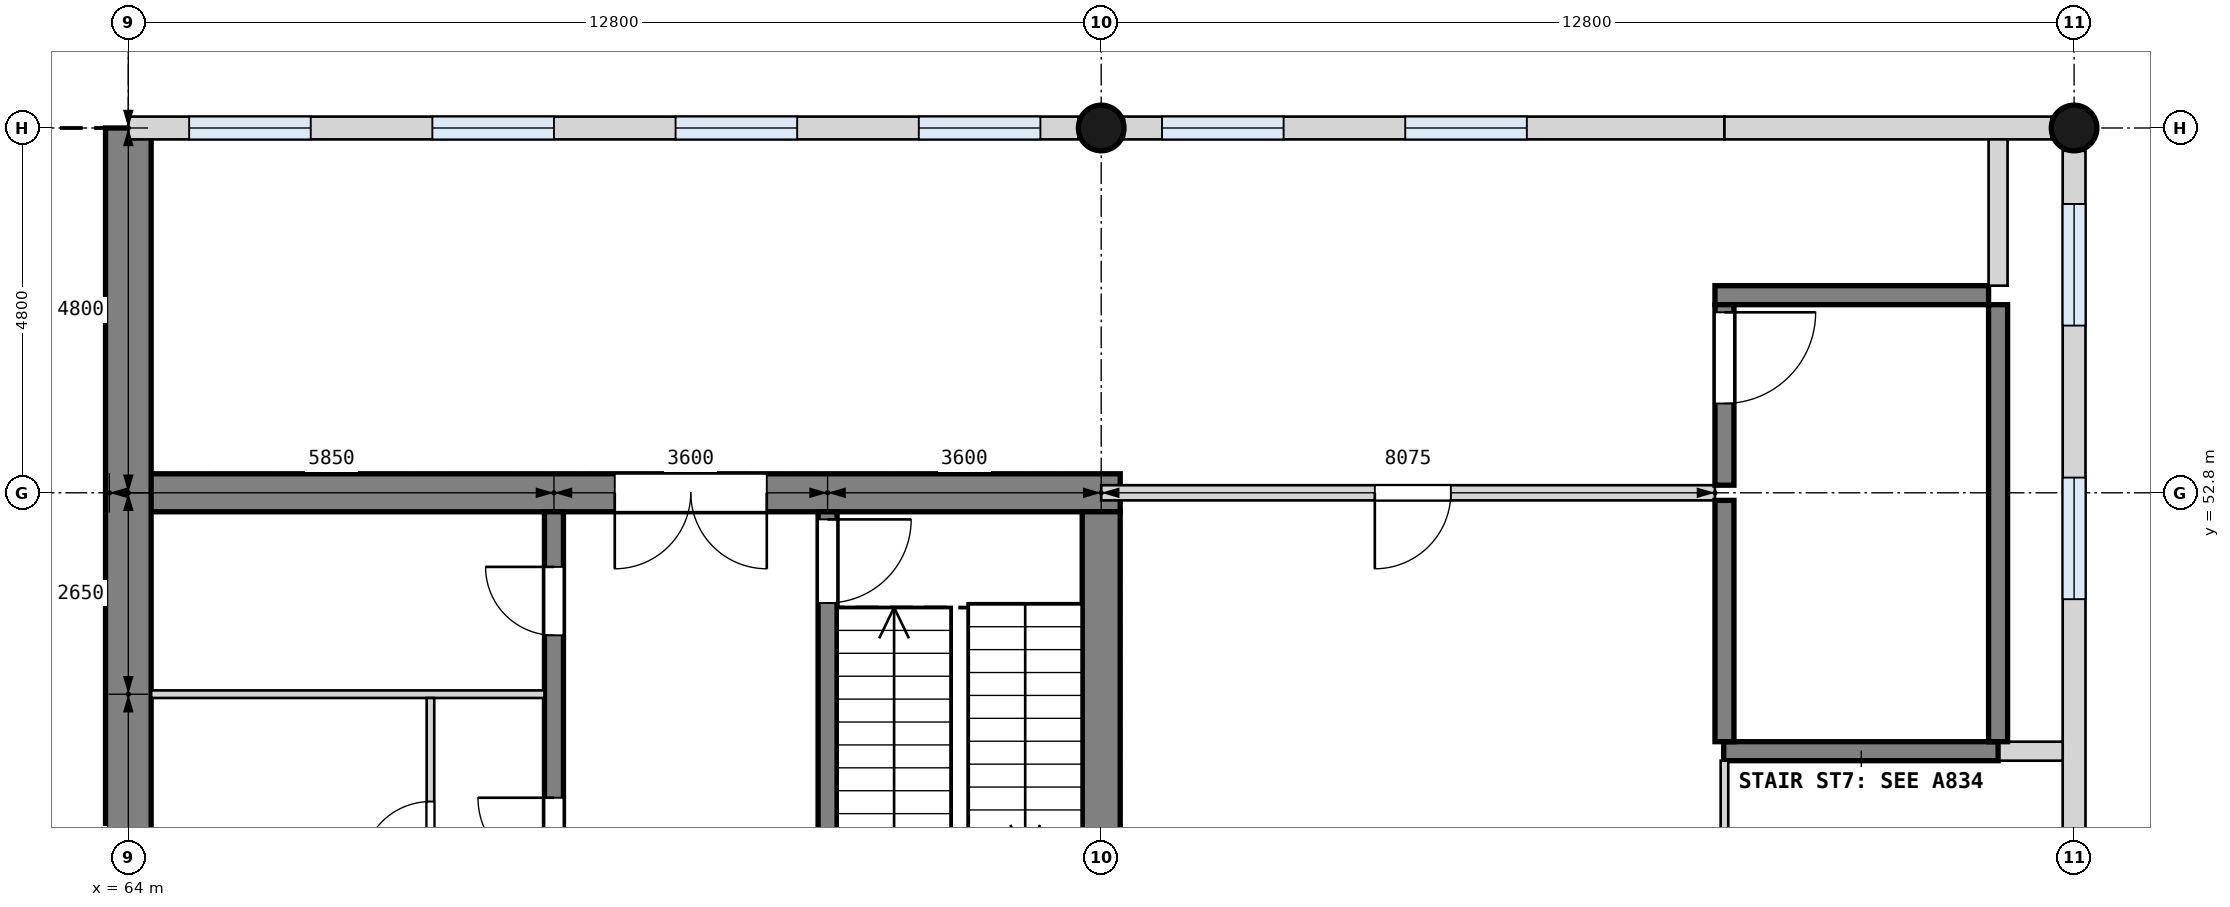
"""IFC4 building model, lengths in metres.
Left out: names, types, materials, properties, quantities, classifications, styles, units other than length and angle.
Written with IfcOpenShell. Run it as: python <this file> out.ifc"""

import sys

from ifc_helpers import new_model, si_unit, direction, frame, frame_2d, origin, origin_2d, place, context, subcontext, project, spatial, rectangle, circle, extrude, element, fill, save


model = new_model("IFC4")
c1 = context("Model", 3, precision=1e-05, world=origin(), true_north=direction((0.0, 1.0)))
c2 = subcontext(c1, "Body", "Model", "MODEL_VIEW")
j1 = project(units=[si_unit("LENGTHUNIT", "METRE"), si_unit("PLANEANGLEUNIT", "RADIAN")], contexts=[c1])
p1 = place(None, origin())
s1 = spatial("IfcSite", under=j1, at=p1, CompositionType="ELEMENT")
p2 = place(p1, origin())
s2 = spatial("IfcBuilding", under=s1, at=p2, CompositionType="ELEMENT")
p3 = place(p2, frame((0.0, 0.0, 4.2)))
s3 = spatial("IfcBuildingStorey", under=s2, at=p3, CompositionType="ELEMENT", Elevation=4.2)
p4 = place(p3, frame((63.75, 52.8, 0.0), z_axis=(0.0, 0.0, 1.0), x_axis=(1.0, 0.0, 0.0)))
e1 = element("IfcWall", 1, at=p4, inside=s3, PredefinedType="SHEAR", context=c2, shape_type="SweptSolid", body=[
    extrude(rectangle(XDim=13.3, YDim=0.5, at=frame_2d((6.65, 0.0))), origin(), (0.0, 0.0, 1.0), 4.2),
])
p5 = place(p4, frame((6.65, 0.0, 0.0)))
e2 = element("IfcOpeningElement", 2, at=p5, cuts=e1, PredefinedType="OPENING", context=c2, shape_type="SweptSolid", body=[
    extrude(rectangle(XDim=2.0, YDim=2.1, at=frame_2d((1.0, 1.05))), frame((0.0, 0.26, 0.0), z_axis=(0.0, -1.0, 0.0), x_axis=(1.0, 0.0, 0.0)), (0.0, 0.0, 1.0), 0.52),
])
p6 = place(p3, frame((76.8, 33.85, 0.0), z_axis=(0.0, 0.0, 1.0), x_axis=(0.0, 1.0, 0.0)))
e3 = element("IfcWall", 3, at=p6, inside=s3, PredefinedType="SHEAR", context=c2, shape_type="SweptSolid", body=[
    extrude(rectangle(XDim=18.7, YDim=0.5, at=frame_2d((9.35, 0.0))), origin(), (0.0, 0.0, 1.0), 4.2),
])
p7 = place(p3, frame((64.0, 28.8, 0.0), z_axis=(0.0, 0.0, 1.0), x_axis=(0.0, 1.0, 0.0)))
e4 = element("IfcWall", 4, at=p7, inside=s3, PredefinedType="SHEAR", context=c2, shape_type="SweptSolid", body=[
    extrude(rectangle(XDim=28.8, YDim=0.6, at=frame_2d((14.4, 0.0))), origin(), (0.0, 0.0, 1.0), 4.2),
])
for number, where, z_axis, x_axis in (
    (5, (89.6, 57.6, 0.0), (0.0, 0.0, 1.0), (1.0, 0.0, 0.0)),
    (6, (76.8, 57.6, 0.0), (0.0, 0.0, 1.0), (1.0, 0.0, 0.0)),
):
    element("IfcColumn", number, at=place(p3, frame(where, z_axis=z_axis, x_axis=x_axis)), inside=s3, PredefinedType="COLUMN", context=c2, shape_type="SweptSolid", body=[
        extrude(circle(Radius=0.3, at=origin_2d()), origin(), (0.0, 0.0, 1.0), 4.2),
    ])
p8 = place(p3, frame((64.0, 57.6, 0.0), z_axis=(0.0, 0.0, 1.0), x_axis=(1.0, 0.0, 0.0)))
e7 = element("IfcWall", 7, at=p8, inside=s3, PredefinedType="SOLIDWALL", context=c2, shape_type="SweptSolid", body=[
    extrude(rectangle(XDim=12.5, YDim=0.3, at=frame_2d((6.25, 0.0))), origin(), (0.0, 0.0, 1.0), 3.0),
])
p9 = place(p8, frame((0.8, 0.0, 1.0)))
e8 = element("IfcOpeningElement", 8, at=p9, cuts=e7, PredefinedType="OPENING", context=c2, shape_type="SweptSolid", body=[
    extrude(rectangle(XDim=1.6, YDim=1.8, at=frame_2d((0.8, 0.9))), frame((0.0, 0.16, 0.0), z_axis=(0.0, -1.0, 0.0), x_axis=(1.0, 0.0, 0.0)), (0.0, 0.0, 1.0), 0.32),
])
p10 = place(p8, frame((4.0, 0.0, 1.0)))
e9 = element("IfcOpeningElement", 9, at=p10, cuts=e7, PredefinedType="OPENING", context=c2, shape_type="SweptSolid", body=[
    extrude(rectangle(XDim=1.6, YDim=1.8, at=frame_2d((0.8, 0.9))), frame((0.0, 0.16, 0.0), z_axis=(0.0, -1.0, 0.0), x_axis=(1.0, 0.0, 0.0)), (0.0, 0.0, 1.0), 0.32),
])
p11 = place(p8, frame((7.2, 0.0, 1.0)))
e10 = element("IfcOpeningElement", 10, at=p11, cuts=e7, PredefinedType="OPENING", context=c2, shape_type="SweptSolid", body=[
    extrude(rectangle(XDim=1.6, YDim=1.8, at=frame_2d((0.8, 0.9))), frame((0.0, 0.16, 0.0), z_axis=(0.0, -1.0, 0.0), x_axis=(1.0, 0.0, 0.0)), (0.0, 0.0, 1.0), 0.32),
])
p12 = place(p8, frame((10.4, 0.0, 1.0)))
e11 = element("IfcOpeningElement", 11, at=p12, cuts=e7, PredefinedType="OPENING", context=c2, shape_type="SweptSolid", body=[
    extrude(rectangle(XDim=1.6, YDim=1.8, at=frame_2d((0.8, 0.9))), frame((0.0, 0.16, 0.0), z_axis=(0.0, -1.0, 0.0), x_axis=(1.0, 0.0, 0.0)), (0.0, 0.0, 1.0), 0.32),
])
p13 = place(p3, frame((77.1, 57.6, 0.0), z_axis=(0.0, 0.0, 1.0), x_axis=(1.0, 0.0, 0.0)))
e12 = element("IfcWall", 12, at=p13, inside=s3, PredefinedType="SOLIDWALL", context=c2, shape_type="SweptSolid", body=[
    extrude(rectangle(XDim=7.9, YDim=0.3, at=frame_2d((3.95, 0.0))), origin(), (0.0, 0.0, 1.0), 3.0),
])
p14 = place(p13, frame((0.5, 0.0, 1.0)))
e13 = element("IfcOpeningElement", 13, at=p14, cuts=e12, PredefinedType="OPENING", context=c2, shape_type="SweptSolid", body=[
    extrude(rectangle(XDim=1.6, YDim=1.8, at=frame_2d((0.8, 0.9))), frame((0.0, 0.16, 0.0), z_axis=(0.0, -1.0, 0.0), x_axis=(1.0, 0.0, 0.0)), (0.0, 0.0, 1.0), 0.32),
])
p15 = place(p13, frame((3.7, 0.0, 1.0)))
e14 = element("IfcOpeningElement", 14, at=p15, cuts=e12, PredefinedType="OPENING", context=c2, shape_type="SweptSolid", body=[
    extrude(rectangle(XDim=1.6, YDim=1.8, at=frame_2d((0.8, 0.9))), frame((0.0, 0.16, 0.0), z_axis=(0.0, -1.0, 0.0), x_axis=(1.0, 0.0, 0.0)), (0.0, 0.0, 1.0), 0.32),
])
p16 = place(p3, frame((85.0, 57.6, 0.0), z_axis=(0.0, 0.0, 1.0), x_axis=(1.0, 0.0, 0.0)))
e15 = element("IfcWall", 15, at=p16, inside=s3, PredefinedType="SOLIDWALL", context=c2, shape_type="SweptSolid", body=[
    extrude(rectangle(XDim=4.3, YDim=0.3, at=frame_2d((2.15, 0.0))), origin(), (0.0, 0.0, 1.0), 3.0),
])
p17 = place(p3, frame((89.6, 43.5, 0.0), z_axis=(0.0, 0.0, 1.0), x_axis=(0.0, 1.0, 0.0)))
e16 = element("IfcWall", 16, at=p17, inside=s3, PredefinedType="SOLIDWALL", context=c2, shape_type="SweptSolid", body=[
    extrude(rectangle(XDim=13.8, YDim=0.3, at=frame_2d((6.9, 0.0))), origin(), (0.0, 0.0, 1.0), 2.9),
])
p18 = place(p17, frame((0.7, 0.0, 1.0)))
e17 = element("IfcOpeningElement", 17, at=p18, cuts=e16, PredefinedType="OPENING", context=c2, shape_type="SweptSolid", body=[
    extrude(rectangle(XDim=1.6, YDim=1.8, at=frame_2d((0.8, 0.9))), frame((0.0, 0.16, 0.0), z_axis=(0.0, -1.0, 0.0), x_axis=(1.0, 0.0, 0.0)), (0.0, 0.0, 1.0), 0.32),
])
p19 = place(p17, frame((7.9, 0.0, 1.0)))
e18 = element("IfcOpeningElement", 18, at=p19, cuts=e16, PredefinedType="OPENING", context=c2, shape_type="SweptSolid", body=[
    extrude(rectangle(XDim=1.6, YDim=1.8, at=frame_2d((0.8, 0.9))), frame((0.0, 0.16, 0.0), z_axis=(0.0, -1.0, 0.0), x_axis=(1.0, 0.0, 0.0)), (0.0, 0.0, 1.0), 0.32),
])
p20 = place(p17, frame((11.5, 0.0, 1.0)))
e19 = element("IfcOpeningElement", 19, at=p20, cuts=e16, PredefinedType="OPENING", context=c2, shape_type="SweptSolid", body=[
    extrude(rectangle(XDim=1.6, YDim=1.8, at=frame_2d((0.8, 0.9))), frame((0.0, 0.16, 0.0), z_axis=(0.0, -1.0, 0.0), x_axis=(1.0, 0.0, 0.0)), (0.0, 0.0, 1.0), 0.32),
])
p21 = place(p3, frame((73.2, 46.475, 0.0), z_axis=(0.0, 0.0, 1.0), x_axis=(0.0, 1.0, 0.0)))
e20 = element("IfcWall", 20, at=p21, inside=s3, PredefinedType="SOLIDWALL", context=c2, shape_type="SweptSolid", body=[
    extrude(rectangle(XDim=6.075, YDim=0.25, at=frame_2d((3.038, 0.0))), origin(), (0.0, 0.0, 1.0), 3.9),
])
p22 = place(p21, frame((4.875, 0.0, 0.0)))
e21 = element("IfcOpeningElement", 21, at=p22, cuts=e20, PredefinedType="OPENING", context=c2, shape_type="SweptSolid", body=[
    extrude(rectangle(XDim=1.1, YDim=2.1, at=frame_2d((0.55, 1.05))), frame((0.0, 0.135, 0.0), z_axis=(0.0, -1.0, 0.0), x_axis=(1.0, 0.0, 0.0)), (0.0, 0.0, 1.0), 0.27),
])
p23 = place(p3, frame((69.6, 46.475, 0.0), z_axis=(0.0, 0.0, 1.0), x_axis=(0.0, 1.0, 0.0)))
e22 = element("IfcWall", 22, at=p23, inside=s3, PredefinedType="SOLIDWALL", context=c2, shape_type="SweptSolid", body=[
    extrude(rectangle(XDim=6.075, YDim=0.25, at=frame_2d((3.038, 0.0))), origin(), (0.0, 0.0, 1.0), 3.9),
])
p24 = place(p23, frame((1.312, 0.0, 0.0)))
e23 = element("IfcOpeningElement", 23, at=p24, cuts=e22, PredefinedType="OPENING", context=c2, shape_type="SweptSolid", body=[
    extrude(rectangle(XDim=1.0, YDim=2.1, at=frame_2d((0.5, 1.05))), frame((0.0, 0.135, 0.0), z_axis=(0.0, -1.0, 0.0), x_axis=(1.0, 0.0, 0.0)), (0.0, 0.0, 1.0), 0.27),
])
p25 = place(p23, frame((4.45, 0.0, 0.0)))
e24 = element("IfcOpeningElement", 24, at=p25, cuts=e22, PredefinedType="OPENING", context=c2, shape_type="SweptSolid", body=[
    extrude(rectangle(XDim=0.9, YDim=2.1, at=frame_2d((0.45, 1.05))), frame((0.0, 0.135, 0.0), z_axis=(0.0, -1.0, 0.0), x_axis=(1.0, 0.0, 0.0)), (0.0, 0.0, 1.0), 0.27),
])
p26 = place(p3, frame((69.475, 50.15, 0.0), z_axis=(0.0, 0.0, 1.0), x_axis=(-1.0, 0.0, 0.0)))
e25 = element("IfcWall", 25, at=p26, inside=s3, PredefinedType="PARTITIONING", context=c2, shape_type="SweptSolid", body=[
    extrude(rectangle(XDim=5.175, YDim=0.1, at=frame_2d((2.587, 0.0))), origin(), (0.0, 0.0, 1.0), 3.9),
])
p27 = place(p3, frame((67.975, 46.475, 0.0), z_axis=(0.0, 0.0, 1.0), x_axis=(0.0, 1.0, 0.0)))
e26 = element("IfcWall", 26, at=p27, inside=s3, PredefinedType="PARTITIONING", context=c2, shape_type="SweptSolid", body=[
    extrude(rectangle(XDim=3.625, YDim=0.1, at=frame_2d((1.812, 0.0))), origin(), (0.0, 0.0, 1.0), 3.9),
])
p28 = place(p27, frame((1.363, 0.0, 0.0)))
e27 = element("IfcOpeningElement", 27, at=p28, cuts=e26, PredefinedType="OPENING", context=c2, shape_type="SweptSolid", body=[
    extrude(rectangle(XDim=0.9, YDim=2.1, at=frame_2d((0.45, 1.05))), frame((0.0, 0.06, 0.0), z_axis=(0.0, -1.0, 0.0), x_axis=(1.0, 0.0, 0.0)), (0.0, 0.0, 1.0), 0.12),
])
p29 = place(p3, frame((89.45, 49.4, 0.0), z_axis=(0.0, 0.0, 1.0), x_axis=(-1.0, 0.0, 0.0)))
e28 = element("IfcWall", 28, at=p29, inside=s3, PredefinedType="PARTITIONING", context=c2, shape_type="SweptSolid", body=[
    extrude(rectangle(XDim=0.85, YDim=0.25, at=frame_2d((0.425, 0.0))), origin(), (0.0, 0.0, 1.0), 3.9),
])
p30 = place(p3, frame((88.6, 49.4, 0.0), z_axis=(0.0, 0.0, 1.0), x_axis=(-1.0, 0.0, 0.0)))
e29 = element("IfcWall", 29, at=p30, inside=s3, PredefinedType="SHEAR", context=c2, shape_type="SweptSolid", body=[
    extrude(rectangle(XDim=3.61, YDim=0.25, at=frame_2d((1.805, 0.0))), origin(), (0.0, 0.0, 1.0), 3.9),
])
p31 = place(p3, frame((84.875, 52.8, 0.0), z_axis=(0.0, 0.0, 1.0), x_axis=(-1.0, 0.0, 0.0)))
e30 = element("IfcWall", 30, at=p31, inside=s3, PredefinedType="PARTITIONING", context=c2, shape_type="SweptSolid", body=[
    extrude(rectangle(XDim=8.075, YDim=0.2, at=frame_2d((4.038, 0.0))), origin(), (0.0, 0.0, 1.0), 3.9),
])
p32 = place(p31, frame((3.475, 0.0, 0.0)))
e31 = element("IfcOpeningElement", 31, at=p32, cuts=e30, PredefinedType="OPENING", context=c2, shape_type="SweptSolid", body=[
    extrude(rectangle(XDim=1.0, YDim=2.1, at=frame_2d((0.5, 1.05))), frame((0.0, 0.11, 0.0), z_axis=(0.0, -1.0, 0.0), x_axis=(1.0, 0.0, 0.0)), (0.0, 0.0, 1.0), 0.22),
])
p33 = place(p3, frame((88.475, 55.4, 0.0), z_axis=(0.0, 0.0, 1.0), x_axis=(-1.0, 0.0, 0.0)))
e32 = element("IfcWall", 32, at=p33, inside=s3, PredefinedType="SHEAR", context=c2, shape_type="SweptSolid", body=[
    extrude(rectangle(XDim=3.6, YDim=0.25, at=frame_2d((1.8, 0.0))), origin(), (0.0, 0.0, 1.0), 3.9),
])
p34 = place(p3, frame((88.6, 49.525, 0.0), z_axis=(0.0, 0.0, 1.0), x_axis=(0.0, 1.0, 0.0)))
e33 = element("IfcWall", 33, at=p34, inside=s3, PredefinedType="SHEAR", context=c2, shape_type="SweptSolid", body=[
    extrude(rectangle(XDim=5.75, YDim=0.25, at=frame_2d((2.875, 0.0))), origin(), (0.0, 0.0, 1.0), 3.9),
])
p35 = place(p3, frame((88.6, 55.525, 0.0), z_axis=(0.0, 0.0, 1.0), x_axis=(0.0, 1.0, 0.0)))
e34 = element("IfcWall", 34, at=p35, inside=s3, PredefinedType="PARTITIONING", context=c2, shape_type="SweptSolid", body=[
    extrude(rectangle(XDim=1.925, YDim=0.25, at=frame_2d((0.962, 0.0))), origin(), (0.0, 0.0, 1.0), 3.9),
])
p36 = place(p3, frame((85.0, 46.45, 0.0), z_axis=(0.0, 0.0, 1.0), x_axis=(0.0, 1.0, 0.0)))
e35 = element("IfcWall", 35, at=p36, inside=s3, PredefinedType="PARTITIONING", context=c2, shape_type="SweptSolid", body=[
    extrude(rectangle(XDim=2.825, YDim=0.1, at=frame_2d((1.413, 0.0))), origin(), (0.0, 0.0, 1.0), 3.9),
])
p37 = place(p3, frame((85.0, 49.525, 0.0), z_axis=(0.0, 0.0, 1.0), x_axis=(0.0, 1.0, 0.0)))
e36 = element("IfcWall", 36, at=p37, inside=s3, PredefinedType="SHEAR", context=c2, shape_type="SweptSolid", body=[
    extrude(rectangle(XDim=3.175, YDim=0.25, at=frame_2d((1.587, 0.0))), origin(), (0.0, 0.0, 1.0), 3.9),
])
p38 = place(p3, frame((85.0, 52.9, 0.0), z_axis=(0.0, 0.0, 1.0), x_axis=(0.0, 1.0, 0.0)))
e37 = element("IfcWall", 37, at=p38, inside=s3, PredefinedType="SHEAR", context=c2, shape_type="SweptSolid", body=[
    extrude(rectangle(XDim=2.375, YDim=0.25, at=frame_2d((1.188, 0.0))), origin(), (0.0, 0.0, 1.0), 3.9),
])
p39 = place(p38, frame((1.075, 0.0, 0.0)))
e38 = element("IfcOpeningElement", 38, at=p39, cuts=e37, PredefinedType="OPENING", context=c2, shape_type="SweptSolid", body=[
    extrude(rectangle(XDim=1.2, YDim=2.1, at=frame_2d((0.6, 1.05))), frame((0.0, 0.135, 0.0), z_axis=(0.0, -1.0, 0.0), x_axis=(1.0, 0.0, 0.0)), (0.0, 0.0, 1.0), 0.27),
])
p40 = place(p22, frame((1.1, 0.0, 0.0), z_axis=(0.0, 0.0, 1.0), x_axis=(-1.0, 0.0, 0.0)))
e39 = element("IfcDoor", 39, at=p40, inside=s3, OperationType="SINGLE_SWING_LEFT", PredefinedType="DOOR", context=c2, shape_type="SweptSolid", body=[
    extrude(rectangle(XDim=1.1, YDim=2.1, at=frame_2d((0.55, 1.05))), frame((0.0, 0.025, 0.0), z_axis=(0.0, -1.0, 0.0), x_axis=(1.0, 0.0, 0.0)), (0.0, 0.0, 1.0), 0.05),
])
fill(e21, e39)
p41 = place(p24, origin())
e40 = element("IfcDoor", 40, at=p41, inside=s3, OperationType="SINGLE_SWING_RIGHT", PredefinedType="DOOR", context=c2, shape_type="SweptSolid", body=[
    extrude(rectangle(XDim=1.0, YDim=2.1, at=frame_2d((0.5, 1.05))), frame((0.0, 0.025, 0.0), z_axis=(0.0, -1.0, 0.0), x_axis=(1.0, 0.0, 0.0)), (0.0, 0.0, 1.0), 0.05),
])
fill(e23, e40)
p42 = place(p28, origin())
e41 = element("IfcDoor", 41, at=p42, inside=s3, OperationType="SINGLE_SWING_LEFT", PredefinedType="DOOR", context=c2, shape_type="SweptSolid", body=[
    extrude(rectangle(XDim=0.9, YDim=2.1, at=frame_2d((0.45, 1.05))), frame((0.0, 0.025, 0.0), z_axis=(0.0, -1.0, 0.0), x_axis=(1.0, 0.0, 0.0)), (0.0, 0.0, 1.0), 0.05),
])
fill(e27, e41)
p43 = place(p25, origin())
e42 = element("IfcDoor", 42, at=p43, inside=s3, OperationType="SINGLE_SWING_RIGHT", PredefinedType="DOOR", context=c2, shape_type="SweptSolid", body=[
    extrude(rectangle(XDim=0.9, YDim=2.1, at=frame_2d((0.45, 1.05))), frame((0.0, 0.025, 0.0), z_axis=(0.0, -1.0, 0.0), x_axis=(1.0, 0.0, 0.0)), (0.0, 0.0, 1.0), 0.05),
])
fill(e24, e42)
p44 = place(p5, frame((2.0, 0.0, 0.0), z_axis=(0.0, 0.0, 1.0), x_axis=(-1.0, 0.0, 0.0)))
e43 = element("IfcDoor", 43, at=p44, inside=s3, OperationType="DOUBLE_DOOR_SINGLE_SWING", PredefinedType="DOOR", context=c2, shape_type="SweptSolid", body=[
    extrude(rectangle(XDim=2.0, YDim=2.1, at=frame_2d((1.0, 1.05))), frame((0.0, 0.025, 0.0), z_axis=(0.0, -1.0, 0.0), x_axis=(1.0, 0.0, 0.0)), (0.0, 0.0, 1.0), 0.05),
])
fill(e2, e43)
p45 = place(p32, origin())
e44 = element("IfcDoor", 44, at=p45, inside=s3, OperationType="SINGLE_SWING_RIGHT", PredefinedType="DOOR", context=c2, shape_type="SweptSolid", body=[
    extrude(rectangle(XDim=1.0, YDim=2.1, at=frame_2d((0.5, 1.05))), frame((0.0, 0.025, 0.0), z_axis=(0.0, -1.0, 0.0), x_axis=(1.0, 0.0, 0.0)), (0.0, 0.0, 1.0), 0.05),
])
fill(e31, e44)
p46 = place(p39, frame((1.2, 0.0, 0.0), z_axis=(0.0, 0.0, 1.0), x_axis=(-1.0, 0.0, 0.0)))
e45 = element("IfcDoor", 45, at=p46, inside=s3, OperationType="SINGLE_SWING_LEFT", PredefinedType="DOOR", context=c2, shape_type="SweptSolid", body=[
    extrude(rectangle(XDim=1.2, YDim=2.1, at=frame_2d((0.6, 1.05))), frame((0.0, 0.025, 0.0), z_axis=(0.0, -1.0, 0.0), x_axis=(1.0, 0.0, 0.0)), (0.0, 0.0, 1.0), 0.05),
])
fill(e38, e45)
p47 = place(p9, origin())
e46 = element("IfcWindow", 46, at=p47, inside=s3, PartitioningType="SINGLE_PANEL", PredefinedType="WINDOW", context=c2, shape_type="SweptSolid", body=[
    extrude(rectangle(XDim=1.6, YDim=1.8, at=frame_2d((0.8, 0.9))), frame((0.0, 0.03, 0.0), z_axis=(0.0, -1.0, 0.0), x_axis=(1.0, 0.0, 0.0)), (0.0, 0.0, 1.0), 0.06),
])
fill(e8, e46)
p48 = place(p10, origin())
e47 = element("IfcWindow", 47, at=p48, inside=s3, PartitioningType="SINGLE_PANEL", PredefinedType="WINDOW", context=c2, shape_type="SweptSolid", body=[
    extrude(rectangle(XDim=1.6, YDim=1.8, at=frame_2d((0.8, 0.9))), frame((0.0, 0.03, 0.0), z_axis=(0.0, -1.0, 0.0), x_axis=(1.0, 0.0, 0.0)), (0.0, 0.0, 1.0), 0.06),
])
fill(e9, e47)
p49 = place(p11, origin())
e48 = element("IfcWindow", 48, at=p49, inside=s3, PartitioningType="SINGLE_PANEL", PredefinedType="WINDOW", context=c2, shape_type="SweptSolid", body=[
    extrude(rectangle(XDim=1.6, YDim=1.8, at=frame_2d((0.8, 0.9))), frame((0.0, 0.03, 0.0), z_axis=(0.0, -1.0, 0.0), x_axis=(1.0, 0.0, 0.0)), (0.0, 0.0, 1.0), 0.06),
])
fill(e10, e48)
p50 = place(p12, origin())
e49 = element("IfcWindow", 49, at=p50, inside=s3, PartitioningType="SINGLE_PANEL", PredefinedType="WINDOW", context=c2, shape_type="SweptSolid", body=[
    extrude(rectangle(XDim=1.6, YDim=1.8, at=frame_2d((0.8, 0.9))), frame((0.0, 0.03, 0.0), z_axis=(0.0, -1.0, 0.0), x_axis=(1.0, 0.0, 0.0)), (0.0, 0.0, 1.0), 0.06),
])
fill(e11, e49)
p51 = place(p14, origin())
e50 = element("IfcWindow", 50, at=p51, inside=s3, PartitioningType="SINGLE_PANEL", PredefinedType="WINDOW", context=c2, shape_type="SweptSolid", body=[
    extrude(rectangle(XDim=1.6, YDim=1.8, at=frame_2d((0.8, 0.9))), frame((0.0, 0.03, 0.0), z_axis=(0.0, -1.0, 0.0), x_axis=(1.0, 0.0, 0.0)), (0.0, 0.0, 1.0), 0.06),
])
fill(e13, e50)
p52 = place(p15, origin())
e51 = element("IfcWindow", 51, at=p52, inside=s3, PartitioningType="SINGLE_PANEL", PredefinedType="WINDOW", context=c2, shape_type="SweptSolid", body=[
    extrude(rectangle(XDim=1.6, YDim=1.8, at=frame_2d((0.8, 0.9))), frame((0.0, 0.03, 0.0), z_axis=(0.0, -1.0, 0.0), x_axis=(1.0, 0.0, 0.0)), (0.0, 0.0, 1.0), 0.06),
])
fill(e14, e51)
p53 = place(p19, origin())
e52 = element("IfcWindow", 52, at=p53, inside=s3, PartitioningType="SINGLE_PANEL", PredefinedType="WINDOW", context=c2, shape_type="SweptSolid", body=[
    extrude(rectangle(XDim=1.6, YDim=1.8, at=frame_2d((0.8, 0.9))), frame((0.0, 0.03, 0.0), z_axis=(0.0, -1.0, 0.0), x_axis=(1.0, 0.0, 0.0)), (0.0, 0.0, 1.0), 0.06),
])
fill(e18, e52)
p54 = place(p20, origin())
e53 = element("IfcWindow", 53, at=p54, inside=s3, PartitioningType="SINGLE_PANEL", PredefinedType="WINDOW", context=c2, shape_type="SweptSolid", body=[
    extrude(rectangle(XDim=1.6, YDim=1.8, at=frame_2d((0.8, 0.9))), frame((0.0, 0.03, 0.0), z_axis=(0.0, -1.0, 0.0), x_axis=(1.0, 0.0, 0.0)), (0.0, 0.0, 1.0), 0.06),
])
fill(e19, e53)
save(model, sys.argv[1])
